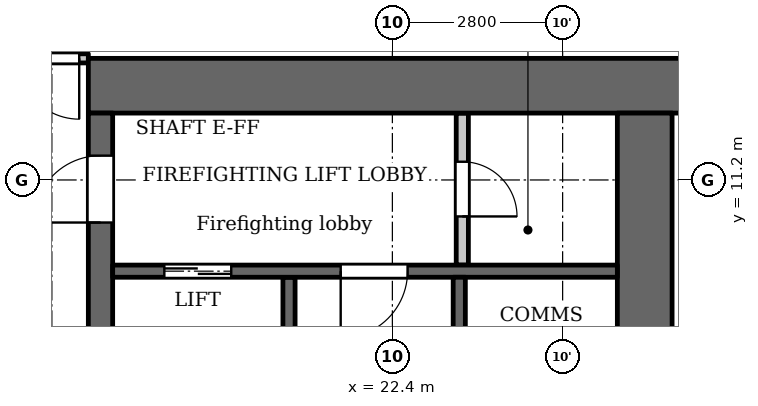
"""IFC4 building model, lengths in metres.
Left out: names, types, materials, properties, quantities, classifications, styles, units other than length and angle.
Written with IfcOpenShell. Run it as: python <this file> out.ifc"""

import sys

from ifc_helpers import new_model, si_unit, direction, frame, frame_2d, origin, place, context, subcontext, project, spatial, rectangle, extrude, element, fill, save


model = new_model("IFC4")
c1 = context("Model", 3, precision=1e-05, world=origin(), true_north=direction((0.0, 1.0)))
c2 = subcontext(c1, "Body", "Model", "MODEL_VIEW")
j1 = project(units=[si_unit("LENGTHUNIT", "METRE"), si_unit("PLANEANGLEUNIT", "RADIAN")], contexts=[c1])
p1 = place(None, origin())
s1 = spatial("IfcSite", under=j1, at=p1, CompositionType="ELEMENT")
p2 = place(p1, origin())
s2 = spatial("IfcBuilding", under=s1, at=p2, CompositionType="ELEMENT")
p3 = place(p2, frame((0.0, 0.0, 90.3)))
s3 = spatial("IfcBuildingStorey", under=s2, at=p3, CompositionType="ELEMENT", Elevation=90.3)
p4 = place(p3, frame((20.7, 2.6, 0.0), z_axis=(0.0, 0.0, 1.0), x_axis=(0.0, 1.0, 0.0)))
e1 = element("IfcWall", 1, at=p4, inside=s3, PredefinedType="SHEAR", context=c2, shape_type="SweptSolid", body=[
    extrude(rectangle(XDim=7.0, YDim=0.2, at=frame_2d((3.5, 0.0))), origin(), (0.0, 0.0, 1.0), 3.2),
])
p5 = place(p3, frame((17.4, 12.75, 0.0), z_axis=(0.0, 0.0, 1.0), x_axis=(1.0, 0.0, 0.0)))
e2 = element("IfcWall", 2, at=p5, inside=s3, PredefinedType="SHEAR", context=c2, shape_type="SweptSolid", body=[
    extrude(rectangle(XDim=10.4, YDim=0.9, at=frame_2d((5.2, 0.0))), origin(), (0.0, 0.0, 1.0), 3.2),
])
p6 = place(p3, frame((17.6, -12.3, 0.0), z_axis=(0.0, 0.0, 1.0), x_axis=(0.0, 1.0, 0.0)))
e3 = element("IfcWall", 3, at=p6, inside=s3, PredefinedType="SHEAR", context=c2, shape_type="SweptSolid", body=[
    extrude(rectangle(XDim=24.6, YDim=0.4, at=frame_2d((12.3, 0.0))), origin(), (0.0, 0.0, 1.0), 3.2),
])
p7 = place(p6, frame((6.0, 0.0, 0.0)))
e4 = element("IfcOpeningElement", 4, at=p7, cuts=e3, PredefinedType="OPENING", context=c2, shape_type="SweptSolid", body=[
    extrude(rectangle(XDim=1.1, YDim=2.1, at=frame_2d((0.55, 1.05))), frame((0.0, 0.21, 0.0), z_axis=(0.0, -1.0, 0.0), x_axis=(1.0, 0.0, 0.0)), (0.0, 0.0, 1.0), 0.42),
])
p8 = place(p6, frame((8.4, 0.0, 0.0)))
e5 = element("IfcOpeningElement", 5, at=p8, cuts=e3, PredefinedType="OPENING", context=c2, shape_type="SweptSolid", body=[
    extrude(rectangle(XDim=1.1, YDim=2.1, at=frame_2d((0.55, 1.05))), frame((0.0, 0.21, 0.0), z_axis=(0.0, -1.0, 0.0), x_axis=(1.0, 0.0, 0.0)), (0.0, 0.0, 1.0), 0.42),
])
p9 = place(p6, frame((10.8, 0.0, 0.0)))
e6 = element("IfcOpeningElement", 6, at=p9, cuts=e3, PredefinedType="OPENING", context=c2, shape_type="SweptSolid", body=[
    extrude(rectangle(XDim=1.1, YDim=2.1, at=frame_2d((0.55, 1.05))), frame((0.0, 0.21, 0.0), z_axis=(0.0, -1.0, 0.0), x_axis=(1.0, 0.0, 0.0)), (0.0, 0.0, 1.0), 0.42),
])
p10 = place(p6, frame((16.75, 0.0, 0.0)))
e7 = element("IfcOpeningElement", 7, at=p10, cuts=e3, PredefinedType="OPENING", context=c2, shape_type="SweptSolid", body=[
    extrude(rectangle(XDim=0.9, YDim=2.1, at=frame_2d((0.45, 1.05))), frame((0.0, 0.21, 0.0), z_axis=(0.0, -1.0, 0.0), x_axis=(1.0, 0.0, 0.0)), (0.0, 0.0, 1.0), 0.42),
])
p11 = place(p6, frame((22.8, 0.0, 0.0)))
e8 = element("IfcOpeningElement", 8, at=p11, cuts=e3, PredefinedType="OPENING", context=c2, shape_type="SweptSolid", body=[
    extrude(rectangle(XDim=1.1, YDim=2.1, at=frame_2d((0.55, 1.05))), frame((0.0, 0.21, 0.0), z_axis=(0.0, -1.0, 0.0), x_axis=(1.0, 0.0, 0.0)), (0.0, 0.0, 1.0), 0.42),
])
p12 = place(p6, frame((0.7, 0.0, 0.0)))
e9 = element("IfcOpeningElement", 9, at=p12, cuts=e3, PredefinedType="OPENING", context=c2, shape_type="SweptSolid", body=[
    extrude(rectangle(XDim=1.1, YDim=2.1, at=frame_2d((0.55, 1.05))), frame((0.0, 0.21, 0.0), z_axis=(0.0, -1.0, 0.0), x_axis=(1.0, 0.0, 0.0)), (0.0, 0.0, 1.0), 0.42),
])
p13 = place(p6, frame((12.775, 0.0, 0.0)))
e10 = element("IfcOpeningElement", 10, at=p13, cuts=e3, PredefinedType="OPENING", context=c2, shape_type="SweptSolid", body=[
    extrude(rectangle(XDim=1.8, YDim=2.1, at=frame_2d((0.9, 1.05))), frame((0.0, 0.21, 0.0), z_axis=(0.0, -1.0, 0.0), x_axis=(1.0, 0.0, 0.0)), (0.0, 0.0, 1.0), 0.42),
])
p14 = place(p3, frame((26.55, -12.3, 0.0), z_axis=(0.0, 0.0, 1.0), x_axis=(0.0, 1.0, 0.0)))
e11 = element("IfcWall", 11, at=p14, inside=s3, PredefinedType="SHEAR", context=c2, shape_type="SweptSolid", body=[
    extrude(rectangle(XDim=24.6, YDim=0.9, at=frame_2d((12.3, 0.0))), origin(), (0.0, 0.0, 1.0), 3.2),
])
p15 = place(p3, frame((23.55, 9.8, 0.0), z_axis=(0.0, 0.0, 1.0), x_axis=(0.0, 1.0, 0.0)))
e12 = element("IfcWall", 12, at=p15, inside=s3, PredefinedType="PARTITIONING", context=c2, shape_type="SweptSolid", body=[
    extrude(rectangle(XDim=2.5, YDim=0.2, at=frame_2d((1.25, 0.0))), origin(), (0.0, 0.0, 1.0), 3.2),
])
p16 = place(p15, frame((0.8, 0.0, 0.0)))
e13 = element("IfcOpeningElement", 13, at=p16, cuts=e12, PredefinedType="OPENING", context=c2, shape_type="SweptSolid", body=[
    extrude(rectangle(XDim=0.9, YDim=2.1, at=frame_2d((0.45, 1.05))), frame((0.0, 0.11, 0.0), z_axis=(0.0, -1.0, 0.0), x_axis=(1.0, 0.0, 0.0)), (0.0, 0.0, 1.0), 0.22),
])
p17 = place(p3, frame((17.8, 9.7, 0.0), z_axis=(0.0, 0.0, 1.0), x_axis=(1.0, 0.0, 0.0)))
e14 = element("IfcWall", 14, at=p17, inside=s3, PredefinedType="SHEAR", context=c2, shape_type="SweptSolid", body=[
    extrude(rectangle(XDim=8.3, YDim=0.2, at=frame_2d((4.15, 0.0))), origin(), (0.0, 0.0, 1.0), 3.2),
])
p18 = place(p17, frame((0.85, 0.0, 0.0)))
e15 = element("IfcOpeningElement", 15, at=p18, cuts=e14, PredefinedType="OPENING", context=c2, shape_type="SweptSolid", body=[
    extrude(rectangle(XDim=1.1, YDim=2.1, at=frame_2d((0.55, 1.05))), frame((0.0, 0.11, 0.0), z_axis=(0.0, -1.0, 0.0), x_axis=(1.0, 0.0, 0.0)), (0.0, 0.0, 1.0), 0.22),
])
p19 = place(p17, frame((3.75, 0.0, 0.0)))
e16 = element("IfcOpeningElement", 16, at=p19, cuts=e14, PredefinedType="OPENING", context=c2, shape_type="SweptSolid", body=[
    extrude(rectangle(XDim=1.1, YDim=2.1, at=frame_2d((0.55, 1.05))), frame((0.0, 0.11, 0.0), z_axis=(0.0, -1.0, 0.0), x_axis=(1.0, 0.0, 0.0)), (0.0, 0.0, 1.0), 0.22),
])
p20 = place(p3, frame((23.5, 2.6, 0.0), z_axis=(0.0, 0.0, 1.0), x_axis=(0.0, 1.0, 0.0)))
e17 = element("IfcWall", 17, at=p20, inside=s3, PredefinedType="SHEAR", context=c2, shape_type="SweptSolid", body=[
    extrude(rectangle(XDim=7.0, YDim=0.2, at=frame_2d((3.5, 0.0))), origin(), (0.0, 0.0, 1.0), 3.2),
])
p21 = place(p3, frame((-17.4, 13.2, 0.0), z_axis=(0.0, 0.0, 1.0), x_axis=(1.0, 0.0, 0.0)))
e18 = element("IfcWall", 18, at=p21, inside=s3, PredefinedType="PARTITIONING", context=c2, shape_type="SweptSolid", body=[
    extrude(rectangle(XDim=34.8, YDim=0.15, at=frame_2d((17.4, 0.0))), origin(), (0.0, 0.0, 1.0), 3.2),
])
p22 = place(p21, frame((0.25, 0.0, 0.0)))
e19 = element("IfcOpeningElement", 19, at=p22, cuts=e18, PredefinedType="OPENING", context=c2, shape_type="SweptSolid", body=[
    extrude(rectangle(XDim=1.0, YDim=2.1, at=frame_2d((0.5, 1.05))), frame((0.0, 0.085, 0.0), z_axis=(0.0, -1.0, 0.0), x_axis=(1.0, 0.0, 0.0)), (0.0, 0.0, 1.0), 0.17),
])
p23 = place(p21, frame((33.65, 0.0, 0.0)))
e20 = element("IfcOpeningElement", 20, at=p23, cuts=e18, PredefinedType="OPENING", context=c2, shape_type="SweptSolid", body=[
    extrude(rectangle(XDim=1.0, YDim=2.1, at=frame_2d((0.5, 1.05))), frame((0.0, 0.085, 0.0), z_axis=(0.0, -1.0, 0.0), x_axis=(1.0, 0.0, 0.0)), (0.0, 0.0, 1.0), 0.17),
])
p24 = place(p21, frame((15.75, 0.0, 0.0)))
e21 = element("IfcOpeningElement", 21, at=p24, cuts=e18, PredefinedType="OPENING", context=c2, shape_type="SweptSolid", body=[
    extrude(rectangle(XDim=1.0, YDim=2.1, at=frame_2d((0.5, 1.05))), frame((0.0, 0.085, 0.0), z_axis=(0.0, -1.0, 0.0), x_axis=(1.0, 0.0, 0.0)), (0.0, 0.0, 1.0), 0.17),
])
p25 = place(p21, frame((21.35, 0.0, 0.0)))
e22 = element("IfcOpeningElement", 22, at=p25, cuts=e18, PredefinedType="OPENING", context=c2, shape_type="SweptSolid", body=[
    extrude(rectangle(XDim=1.0, YDim=2.1, at=frame_2d((0.5, 1.05))), frame((0.0, 0.085, 0.0), z_axis=(0.0, -1.0, 0.0), x_axis=(1.0, 0.0, 0.0)), (0.0, 0.0, 1.0), 0.17),
])
p26 = place(p18, origin())
e23 = element("IfcDoor", 23, at=p26, inside=s3, OperationType="DOUBLE_DOOR_SLIDING", PredefinedType="DOOR", context=c2, shape_type="SweptSolid", body=[
    extrude(rectangle(XDim=1.1, YDim=2.1, at=frame_2d((0.55, 1.05))), frame((0.0, 0.025, 0.0), z_axis=(0.0, -1.0, 0.0), x_axis=(1.0, 0.0, 0.0)), (0.0, 0.0, 1.0), 0.05),
])
fill(e15, e23)
p27 = place(p11, origin())
e24 = element("IfcDoor", 24, at=p27, inside=s3, OperationType="SINGLE_SWING_RIGHT", PredefinedType="DOOR", context=c2, shape_type="SweptSolid", body=[
    extrude(rectangle(XDim=1.1, YDim=2.1, at=frame_2d((0.55, 1.05))), frame((0.0, 0.025, 0.0), z_axis=(0.0, -1.0, 0.0), x_axis=(1.0, 0.0, 0.0)), (0.0, 0.0, 1.0), 0.05),
])
fill(e8, e24)
p28 = place(p16, origin())
e25 = element("IfcDoor", 25, at=p28, inside=s3, OperationType="SINGLE_SWING_LEFT", PredefinedType="DOOR", context=c2, shape_type="SweptSolid", body=[
    extrude(rectangle(XDim=0.9, YDim=2.1, at=frame_2d((0.45, 1.05))), frame((0.0, 0.025, 0.0), z_axis=(0.0, -1.0, 0.0), x_axis=(1.0, 0.0, 0.0)), (0.0, 0.0, 1.0), 0.05),
])
fill(e13, e25)
p29 = place(p19, origin())
e26 = element("IfcDoor", 26, at=p29, inside=s3, OperationType="SINGLE_SWING_LEFT", PredefinedType="DOOR", context=c2, shape_type="SweptSolid", body=[
    extrude(rectangle(XDim=1.1, YDim=2.1, at=frame_2d((0.55, 1.05))), frame((0.0, 0.025, 0.0), z_axis=(0.0, -1.0, 0.0), x_axis=(1.0, 0.0, 0.0)), (0.0, 0.0, 1.0), 0.05),
])
fill(e16, e26)
p30 = place(p23, origin())
e27 = element("IfcDoor", 27, at=p30, inside=s3, OperationType="SINGLE_SWING_RIGHT", PredefinedType="DOOR", context=c2, shape_type="SweptSolid", body=[
    extrude(rectangle(XDim=1.0, YDim=2.1, at=frame_2d((0.5, 1.05))), frame((0.0, 0.025, 0.0), z_axis=(0.0, -1.0, 0.0), x_axis=(1.0, 0.0, 0.0)), (0.0, 0.0, 1.0), 0.05),
])
fill(e20, e27)
save(model, sys.argv[1])
